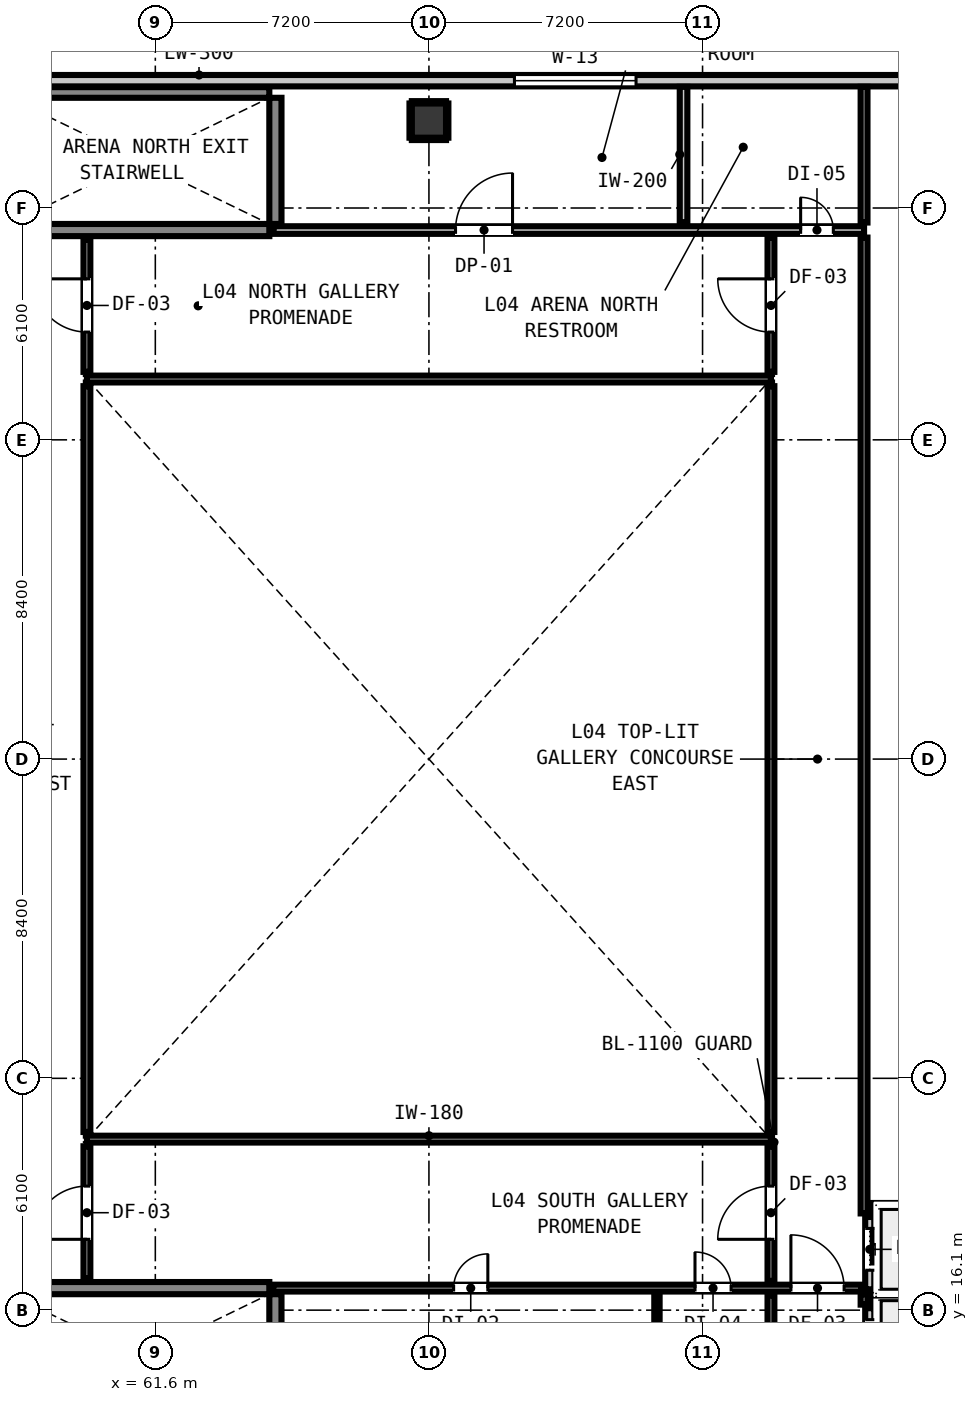
"""IFC4 building model, lengths in metres.
Left out: names, types, materials, properties, quantities, classifications, styles, units other than length and angle.
Written with IfcOpenShell. Run it as: python <this file> out.ifc"""

import sys

from ifc_helpers import new_model, si_unit, direction, frame, frame_2d, origin, origin_2d, place, context, subcontext, project, spatial, rectangle, circle, extrude, element, fill, save


model = new_model("IFC4")
c1 = context("Model", 3, precision=1e-05, world=origin(), true_north=direction((0.0, 1.0)))
c2 = subcontext(c1, "Body", "Model", "MODEL_VIEW")
j1 = project(units=[si_unit("LENGTHUNIT", "METRE"), si_unit("PLANEANGLEUNIT", "RADIAN")], contexts=[c1])
p1 = place(None, origin())
s1 = spatial("IfcSite", under=j1, at=p1, CompositionType="ELEMENT")
p2 = place(p1, origin())
s2 = spatial("IfcBuilding", under=s1, at=p2, CompositionType="ELEMENT")
p3 = place(p2, frame((0.0, 0.0, 17.8)))
s3 = spatial("IfcBuildingStorey", under=s2, at=p3, CompositionType="ELEMENT", Elevation=17.8)
p4 = place(p3, frame((64.76, 13.2, 0.0), z_axis=(0.0, 0.0, 1.0), x_axis=(0.0, 1.0, 0.0)))
e1 = element("IfcWall", 1, at=p4, inside=s3, PredefinedType="SHEAR", context=c2, shape_type="SweptSolid", body=[
    extrude(rectangle(XDim=3.32, YDim=0.32, at=frame_2d((1.66, 0.0))), origin(), (0.0, 0.0, 1.0), 4.2),
])
p5 = place(p3, frame((56.2, 16.68, 0.0), z_axis=(0.0, 0.0, 1.0), x_axis=(1.0, 0.0, 0.0)))
e2 = element("IfcWall", 2, at=p5, inside=s3, PredefinedType="SHEAR", context=c2, shape_type="SweptSolid", body=[
    extrude(rectangle(XDim=8.4, YDim=0.32, at=frame_2d((4.2, 0.0))), origin(), (0.0, 0.0, 1.0), 4.2),
])
p6 = place(p5, frame((0.23, 0.0, 0.0)))
e3 = element("IfcOpeningElement", 3, at=p6, cuts=e2, PredefinedType="OPENING", context=c2, shape_type="SweptSolid", body=[
    extrude(rectangle(XDim=1.1, YDim=2.15, at=frame_2d((0.55, 1.075))), frame((0.0, 0.17, 0.0), z_axis=(0.0, -1.0, 0.0), x_axis=(1.0, 0.0, 0.0)), (0.0, 0.0, 1.0), 0.34),
])
p7 = place(p3, frame((64.76, 44.68, 0.0), z_axis=(0.0, 0.0, 1.0), x_axis=(0.0, 1.0, 0.0)))
e4 = element("IfcWall", 4, at=p7, inside=s3, PredefinedType="SHEAR", context=c2, shape_type="SweptSolid", body=[
    extrude(rectangle(XDim=3.32, YDim=0.32, at=frame_2d((1.66, 0.0))), origin(), (0.0, 0.0, 1.0), 4.2),
])
p8 = place(p3, frame((56.2, 48.14, 0.0), z_axis=(0.0, 0.0, 1.0), x_axis=(1.0, 0.0, 0.0)))
e5 = element("IfcWall", 5, at=p8, inside=s3, PredefinedType="SHEAR", context=c2, shape_type="SweptSolid", body=[
    extrude(rectangle(XDim=8.4, YDim=0.28, at=frame_2d((4.2, 0.0))), origin(), (0.0, 0.0, 1.0), 4.2),
])
p9 = place(p3, frame((56.2, 44.52, 0.0), z_axis=(0.0, 0.0, 1.0), x_axis=(1.0, 0.0, 0.0)))
e6 = element("IfcWall", 6, at=p9, inside=s3, PredefinedType="SHEAR", context=c2, shape_type="SweptSolid", body=[
    extrude(rectangle(XDim=8.4, YDim=0.32, at=frame_2d((4.2, 0.0))), origin(), (0.0, 0.0, 1.0), 4.2),
])
p10 = place(p9, frame((0.23, 0.0, 0.0)))
e7 = element("IfcOpeningElement", 7, at=p10, cuts=e6, PredefinedType="OPENING", context=c2, shape_type="SweptSolid", body=[
    extrude(rectangle(XDim=1.1, YDim=2.15, at=frame_2d((0.55, 1.075))), frame((0.0, 0.17, 0.0), z_axis=(0.0, -1.0, 0.0), x_axis=(1.0, 0.0, 0.0)), (0.0, 0.0, 1.0), 0.34),
])
p11 = place(p3, frame((68.8, 47.4, 0.0), z_axis=(0.0, 0.0, 1.0), x_axis=(1.0, 0.0, 0.0)))
e8 = element("IfcColumn", 8, at=p11, inside=s3, PredefinedType="COLUMN", context=c2, shape_type="SweptSolid", body=[
    extrude(circle(Radius=0.45, at=origin_2d()), origin(), (0.0, 0.0, 1.0), 4.2),
])
p12 = place(p3, frame((54.55, 48.45, 0.0), z_axis=(0.0, 0.0, 1.0), x_axis=(1.0, 0.0, 0.0)))
e9 = element("IfcWall", 9, at=p12, inside=s3, PredefinedType="STANDARD", context=c2, shape_type="SweptSolid", body=[
    extrude(rectangle(XDim=28.5, YDim=0.3, at=frame_2d((14.25, 0.0))), origin(), (0.0, 0.0, 1.0), 4.2),
])
p13 = place(p12, frame((16.5, 0.0, 1.6)))
e10 = element("IfcOpeningElement", 10, at=p13, cuts=e9, PredefinedType="OPENING", context=c2, shape_type="SweptSolid", body=[
    extrude(rectangle(XDim=3.2, YDim=1.4, at=frame_2d((1.6, 0.7))), frame((0.0, 0.16, 0.0), z_axis=(0.0, -1.0, 0.0), x_axis=(1.0, 0.0, 0.0)), (0.0, 0.0, 1.0), 0.32),
])
p14 = place(p3, frame((80.4, 16.4, 0.0), z_axis=(0.0, 0.0, 1.0), x_axis=(1.0, 0.0, 0.0)))
e11 = element("IfcWall", 11, at=p14, inside=s3, PredefinedType="PARTITIONING", context=c2, shape_type="SweptSolid", body=[
    extrude(rectangle(XDim=2.2, YDim=0.24, at=frame_2d((1.1, 0.0))), origin(), (0.0, 0.0, 1.0), 3.78),
])
p15 = place(p3, frame((80.4, 14.448, 0.0), z_axis=(0.0, 0.0, 1.0), x_axis=(0.0, 1.0, 0.0)))
e12 = element("IfcWall", 12, at=p15, inside=s3, PredefinedType="PARTITIONING", context=c2, shape_type="SweptSolid", body=[
    extrude(rectangle(XDim=1.704, YDim=0.24, at=frame_2d((0.852, 0.0))), origin(), (0.0, 0.0, 1.0), 3.78),
])
p16 = place(p15, frame((0.302, 0.0, 0.0)))
e13 = element("IfcOpeningElement", 13, at=p16, cuts=e12, PredefinedType="OPENING", context=c2, shape_type="SweptSolid", body=[
    extrude(rectangle(XDim=1.1, YDim=2.15, at=frame_2d((0.55, 1.075))), frame((0.0, 0.13, 0.0), z_axis=(0.0, -1.0, 0.0), x_axis=(1.0, 0.0, 0.0)), (0.0, 0.0, 1.0), 0.26),
])
p17 = place(p3, frame((80.4, 18.8, 0.0), z_axis=(0.0, 0.0, 1.0), x_axis=(1.0, 0.0, 0.0)))
e14 = element("IfcWall", 14, at=p17, inside=s3, PredefinedType="PARTITIONING", context=c2, shape_type="SweptSolid", body=[
    extrude(rectangle(XDim=2.2, YDim=0.24, at=frame_2d((1.1, 0.0))), origin(), (0.0, 0.0, 1.0), 3.78),
])
p18 = place(p3, frame((80.4, 16.648, 0.0), z_axis=(0.0, 0.0, 1.0), x_axis=(0.0, 1.0, 0.0)))
e15 = element("IfcWall", 15, at=p18, inside=s3, PredefinedType="PARTITIONING", context=c2, shape_type="SweptSolid", body=[
    extrude(rectangle(XDim=1.904, YDim=0.24, at=frame_2d((0.952, 0.0))), origin(), (0.0, 0.0, 1.0), 3.78),
])
p19 = place(p18, frame((0.502, 0.0, 0.0)))
e16 = element("IfcOpeningElement", 16, at=p19, cuts=e15, PredefinedType="OPENING", context=c2, shape_type="SweptSolid", body=[
    extrude(rectangle(XDim=1.1, YDim=2.15, at=frame_2d((0.55, 1.075))), frame((0.0, 0.13, 0.0), z_axis=(0.0, -1.0, 0.0), x_axis=(1.0, 0.0, 0.0)), (0.0, 0.0, 1.0), 0.26),
])
p20 = place(p3, frame((64.71, 44.52, 0.0), z_axis=(0.0, 0.0, 1.0), x_axis=(1.0, 0.0, 0.0)))
e17 = element("IfcWall", 17, at=p20, inside=s3, PredefinedType="PARTITIONING", context=c2, shape_type="SweptSolid", body=[
    extrude(rectangle(XDim=15.54, YDim=0.2, at=frame_2d((7.77, 0.0))), origin(), (0.0, 0.0, 1.0), 3.78),
])
p21 = place(p20, frame((4.79, 0.0, 0.0)))
e18 = element("IfcOpeningElement", 18, at=p21, cuts=e17, PredefinedType="OPENING", context=c2, shape_type="SweptSolid", body=[
    extrude(rectangle(XDim=1.5, YDim=2.15, at=frame_2d((0.75, 1.075))), frame((0.0, 0.11, 0.0), z_axis=(0.0, -1.0, 0.0), x_axis=(1.0, 0.0, 0.0)), (0.0, 0.0, 1.0), 0.22),
])
p22 = place(p20, frame((13.871, 0.0, 0.0)))
e19 = element("IfcOpeningElement", 19, at=p22, cuts=e17, PredefinedType="OPENING", context=c2, shape_type="SweptSolid", body=[
    extrude(rectangle(XDim=0.86, YDim=2.02, at=frame_2d((0.43, 1.01))), frame((0.0, 0.11, 0.0), z_axis=(0.0, -1.0, 0.0), x_axis=(1.0, 0.0, 0.0)), (0.0, 0.0, 1.0), 0.22),
])
p23 = place(p3, frame((64.7, 16.68, 0.0), z_axis=(0.0, 0.0, 1.0), x_axis=(1.0, 0.0, 0.0)))
e20 = element("IfcWall", 20, at=p23, inside=s3, PredefinedType="PARTITIONING", context=c2, shape_type="SweptSolid", body=[
    extrude(rectangle(XDim=15.482, YDim=0.18, at=frame_2d((7.741, 0.0))), origin(), (0.0, 0.0, 1.0), 3.78),
])
p24 = place(p23, frame((13.625, 0.0, 0.0)))
e21 = element("IfcOpeningElement", 21, at=p24, cuts=e20, PredefinedType="OPENING", context=c2, shape_type="SweptSolid", body=[
    extrude(rectangle(XDim=1.4, YDim=2.15, at=frame_2d((0.7, 1.075))), frame((0.0, 0.1, 0.0), z_axis=(0.0, -1.0, 0.0), x_axis=(1.0, 0.0, 0.0)), (0.0, 0.0, 1.0), 0.2),
])
p25 = place(p23, frame((4.75, 0.0, 0.0)))
e22 = element("IfcOpeningElement", 22, at=p25, cuts=e20, PredefinedType="OPENING", context=c2, shape_type="SweptSolid", body=[
    extrude(rectangle(XDim=0.9, YDim=2.1, at=frame_2d((0.45, 1.05))), frame((0.0, 0.1, 0.0), z_axis=(0.0, -1.0, 0.0), x_axis=(1.0, 0.0, 0.0)), (0.0, 0.0, 1.0), 0.2),
])
p26 = place(p23, frame((11.101, 0.0, 0.0)))
e23 = element("IfcOpeningElement", 23, at=p26, cuts=e20, PredefinedType="OPENING", context=c2, shape_type="SweptSolid", body=[
    extrude(rectangle(XDim=0.95, YDim=2.1, at=frame_2d((0.475, 1.05))), frame((0.0, 0.1, 0.0), z_axis=(0.0, -1.0, 0.0), x_axis=(1.0, 0.0, 0.0)), (0.0, 0.0, 1.0), 0.2),
])
for number, where, z_axis, x_axis in (
    (24, (59.8, 20.6, 0.0), (0.0, 0.0, 1.0), (1.0, 0.0, 0.0)),
    (25, (59.8, 40.6, 0.0), (0.0, 0.0, 1.0), (1.0, 0.0, 0.0)),
):
    element("IfcWall", number, at=place(p3, frame(where, z_axis=z_axis, x_axis=x_axis)), inside=s3, PredefinedType="PARTITIONING", context=c2, shape_type="SweptSolid", body=[
        extrude(rectangle(XDim=18.0, YDim=0.18, at=frame_2d((9.0, 0.0))), origin(), (0.0, 0.0, 1.0), 3.78),
    ])
p27 = place(p3, frame((75.5, 44.728, 0.0), z_axis=(0.0, 0.0, 1.0), x_axis=(0.0, 1.0, 0.0)))
e26 = element("IfcWall", 26, at=p27, inside=s3, PredefinedType="PARTITIONING", context=c2, shape_type="SweptSolid", body=[
    extrude(rectangle(XDim=3.56, YDim=0.2, at=frame_2d((1.78, 0.0))), origin(), (0.0, 0.0, 1.0), 3.78),
])
p28 = place(p3, frame((59.8, 16.94, 0.0), z_axis=(0.0, 0.0, 1.0), x_axis=(0.0, 1.0, 0.0)))
e27 = element("IfcWall", 27, at=p28, inside=s3, PredefinedType="PARTITIONING", context=c2, shape_type="SweptSolid", body=[
    extrude(rectangle(XDim=3.472, YDim=0.18, at=frame_2d((1.736, 0.0))), origin(), (0.0, 0.0, 1.0), 3.78),
])
p29 = place(p28, frame((1.024, 0.0, 0.0)))
e28 = element("IfcOpeningElement", 28, at=p29, cuts=e27, PredefinedType="OPENING", context=c2, shape_type="SweptSolid", body=[
    extrude(rectangle(XDim=1.4, YDim=2.15, at=frame_2d((0.7, 1.075))), frame((0.0, 0.1, 0.0), z_axis=(0.0, -1.0, 0.0), x_axis=(1.0, 0.0, 0.0)), (0.0, 0.0, 1.0), 0.2),
])
p30 = place(p3, frame((59.8, 20.788, 0.0), z_axis=(0.0, 0.0, 1.0), x_axis=(0.0, 1.0, 0.0)))
e29 = element("IfcWall", 29, at=p30, inside=s3, PredefinedType="PARTITIONING", context=c2, shape_type="SweptSolid", body=[
    extrude(rectangle(XDim=19.624, YDim=0.18, at=frame_2d((9.812, 0.0))), origin(), (0.0, 0.0, 1.0), 3.78),
])
p31 = place(p3, frame((59.8, 40.788, 0.0), z_axis=(0.0, 0.0, 1.0), x_axis=(0.0, 1.0, 0.0)))
e30 = element("IfcWall", 30, at=p31, inside=s3, PredefinedType="PARTITIONING", context=c2, shape_type="SweptSolid", body=[
    extrude(rectangle(XDim=3.472, YDim=0.18, at=frame_2d((1.736, 0.0))), origin(), (0.0, 0.0, 1.0), 3.78),
])
p32 = place(p31, frame((1.048, 0.0, 0.0)))
e31 = element("IfcOpeningElement", 31, at=p32, cuts=e30, PredefinedType="OPENING", context=c2, shape_type="SweptSolid", body=[
    extrude(rectangle(XDim=1.4, YDim=2.15, at=frame_2d((0.7, 1.075))), frame((0.0, 0.1, 0.0), z_axis=(0.0, -1.0, 0.0), x_axis=(1.0, 0.0, 0.0)), (0.0, 0.0, 1.0), 0.2),
])
p33 = place(p3, frame((77.8, 12.912, 0.0), z_axis=(0.0, 0.0, 1.0), x_axis=(0.0, 1.0, 0.0)))
e32 = element("IfcWall", 32, at=p33, inside=s3, PredefinedType="PARTITIONING", context=c2, shape_type="SweptSolid", body=[
    extrude(rectangle(XDim=3.58, YDim=0.18, at=frame_2d((1.79, 0.0))), origin(), (0.0, 0.0, 1.0), 3.78),
])
p34 = place(p3, frame((77.8, 16.868, 0.0), z_axis=(0.0, 0.0, 1.0), x_axis=(0.0, 1.0, 0.0)))
e33 = element("IfcWall", 33, at=p34, inside=s3, PredefinedType="PARTITIONING", context=c2, shape_type="SweptSolid", body=[
    extrude(rectangle(XDim=3.544, YDim=0.18, at=frame_2d((1.772, 0.0))), origin(), (0.0, 0.0, 1.0), 3.78),
])
p35 = place(p34, frame((1.096, 0.0, 0.0)))
e34 = element("IfcOpeningElement", 34, at=p35, cuts=e33, PredefinedType="OPENING", context=c2, shape_type="SweptSolid", body=[
    extrude(rectangle(XDim=1.4, YDim=2.15, at=frame_2d((0.7, 1.075))), frame((0.0, 0.1, 0.0), z_axis=(0.0, -1.0, 0.0), x_axis=(1.0, 0.0, 0.0)), (0.0, 0.0, 1.0), 0.2),
])
p36 = place(p3, frame((77.8, 20.788, 0.0), z_axis=(0.0, 0.0, 1.0), x_axis=(0.0, 1.0, 0.0)))
e35 = element("IfcWall", 35, at=p36, inside=s3, PredefinedType="PARTITIONING", context=c2, shape_type="SweptSolid", body=[
    extrude(rectangle(XDim=19.624, YDim=0.18, at=frame_2d((9.812, 0.0))), origin(), (0.0, 0.0, 1.0), 3.78),
])
p37 = place(p3, frame((77.8, 40.788, 0.0), z_axis=(0.0, 0.0, 1.0), x_axis=(0.0, 1.0, 0.0)))
e36 = element("IfcWall", 36, at=p37, inside=s3, PredefinedType="PARTITIONING", context=c2, shape_type="SweptSolid", body=[
    extrude(rectangle(XDim=3.534, YDim=0.18, at=frame_2d((1.767, 0.0))), origin(), (0.0, 0.0, 1.0), 3.78),
])
p38 = place(p37, frame((1.048, 0.0, 0.0)))
e37 = element("IfcOpeningElement", 37, at=p38, cuts=e36, PredefinedType="OPENING", context=c2, shape_type="SweptSolid", body=[
    extrude(rectangle(XDim=1.4, YDim=2.15, at=frame_2d((0.7, 1.075))), frame((0.0, 0.1, 0.0), z_axis=(0.0, -1.0, 0.0), x_axis=(1.0, 0.0, 0.0)), (0.0, 0.0, 1.0), 0.2),
])
p39 = place(p3, frame((80.25, 16.245, 0.0), z_axis=(0.0, 0.0, 1.0), x_axis=(0.0, 1.0, 0.0)))
e38 = element("IfcWall", 38, at=p39, inside=s3, PredefinedType="PARTITIONING", context=c2, shape_type="SweptSolid", body=[
    extrude(rectangle(XDim=0.275, YDim=0.18, at=frame_2d((0.137, 0.0))), origin(), (0.0, 0.0, 1.0), 3.78),
])
p40 = place(p3, frame((80.25, 18.645, 0.0), z_axis=(0.0, 0.0, 1.0), x_axis=(0.0, 1.0, 0.0)))
e39 = element("IfcWall", 39, at=p40, inside=s3, PredefinedType="PARTITIONING", context=c2, shape_type="SweptSolid", body=[
    extrude(rectangle(XDim=25.677, YDim=0.18, at=frame_2d((12.838, 0.0))), origin(), (0.0, 0.0, 1.0), 3.78),
])
p41 = place(p3, frame((80.25, 44.718, 0.0), z_axis=(0.0, 0.0, 1.0), x_axis=(0.0, 1.0, 0.0)))
e40 = element("IfcWall", 40, at=p41, inside=s3, PredefinedType="PARTITIONING", context=c2, shape_type="SweptSolid", body=[
    extrude(rectangle(XDim=3.57, YDim=0.18, at=frame_2d((1.785, 0.0))), origin(), (0.0, 0.0, 1.0), 3.78),
])
p42 = place(p3, frame((74.8, 12.912, 0.0), z_axis=(0.0, 0.0, 1.0), x_axis=(0.0, 1.0, 0.0)))
e41 = element("IfcWall", 41, at=p42, inside=s3, PredefinedType="PARTITIONING", context=c2, shape_type="SweptSolid", body=[
    extrude(rectangle(XDim=3.6, YDim=0.14, at=frame_2d((1.8, 0.0))), origin(), (0.0, 0.0, 1.0), 3.78),
])
for number, where, z_axis, x_axis in (
    (42, (68.35, 46.918, 0.0), (0.0, 0.0, 1.0), (1.0, 0.0, 0.0)),
    (43, (68.35, 47.882, 0.0), (0.0, 0.0, 1.0), (1.0, 0.0, 0.0)),
):
    element("IfcWall", number, at=place(p3, frame(where, z_axis=z_axis, x_axis=x_axis)), inside=s3, PredefinedType="PARTITIONING", context=c2, shape_type="SweptSolid", body=[
        extrude(rectangle(XDim=0.9, YDim=0.06, at=frame_2d((0.45, 0.0))), origin(), (0.0, 0.0, 1.0), 1.45),
    ])
for number, where, z_axis, x_axis in (
    (44, (68.318, 46.95, 0.0), (0.0, 0.0, 1.0), (0.0, 1.0, 0.0)),
    (45, (69.282, 46.95, 0.0), (0.0, 0.0, 1.0), (0.0, 1.0, 0.0)),
):
    element("IfcWall", number, at=place(p3, frame(where, z_axis=z_axis, x_axis=x_axis)), inside=s3, PredefinedType="PARTITIONING", context=c2, shape_type="SweptSolid", body=[
        extrude(rectangle(XDim=0.9, YDim=0.06, at=frame_2d((0.45, 0.0))), origin(), (0.0, 0.0, 1.0), 1.45),
    ])
p43 = place(p13, origin())
e46 = element("IfcWindow", 46, at=p43, inside=s3, PartitioningType="SINGLE_PANEL", PredefinedType="LIGHTDOME", context=c2, shape_type="SweptSolid", body=[
    extrude(rectangle(XDim=3.2, YDim=1.4, at=frame_2d((1.6, 0.7))), frame((0.0, 0.03, 0.0), z_axis=(0.0, -1.0, 0.0), x_axis=(1.0, 0.0, 0.0)), (0.0, 0.0, 1.0), 0.06),
])
fill(e10, e46)
p44 = place(p16, origin())
e47 = element("IfcDoor", 47, at=p44, inside=s3, OperationType="SLIDING_TO_LEFT", PredefinedType="DOOR", context=c2, shape_type="SweptSolid", body=[
    extrude(rectangle(XDim=1.1, YDim=2.15, at=frame_2d((0.55, 1.075))), frame((0.0, 0.025, 0.0), z_axis=(0.0, -1.0, 0.0), x_axis=(1.0, 0.0, 0.0)), (0.0, 0.0, 1.0), 0.05),
])
fill(e13, e47)
p45 = place(p19, origin())
e48 = element("IfcDoor", 48, at=p45, inside=s3, OperationType="SLIDING_TO_RIGHT", PredefinedType="DOOR", context=c2, shape_type="SweptSolid", body=[
    extrude(rectangle(XDim=1.1, YDim=2.15, at=frame_2d((0.55, 1.075))), frame((0.0, 0.025, 0.0), z_axis=(0.0, -1.0, 0.0), x_axis=(1.0, 0.0, 0.0)), (0.0, 0.0, 1.0), 0.05),
])
fill(e16, e48)
p46 = place(p29, origin())
e49 = element("IfcDoor", 49, at=p46, inside=s3, OperationType="SINGLE_SWING_LEFT", PredefinedType="DOOR", context=c2, shape_type="SweptSolid", body=[
    extrude(rectangle(XDim=1.4, YDim=2.15, at=frame_2d((0.7, 1.075))), frame((0.0, 0.025, 0.0), z_axis=(0.0, -1.0, 0.0), x_axis=(1.0, 0.0, 0.0)), (0.0, 0.0, 1.0), 0.05),
])
fill(e28, e49)
p47 = place(p32, origin())
e50 = element("IfcDoor", 50, at=p47, inside=s3, OperationType="SINGLE_SWING_RIGHT", PredefinedType="DOOR", context=c2, shape_type="SweptSolid", body=[
    extrude(rectangle(XDim=1.4, YDim=2.15, at=frame_2d((0.7, 1.075))), frame((0.0, 0.025, 0.0), z_axis=(0.0, -1.0, 0.0), x_axis=(1.0, 0.0, 0.0)), (0.0, 0.0, 1.0), 0.05),
])
fill(e31, e50)
p48 = place(p35, origin())
e51 = element("IfcDoor", 51, at=p48, inside=s3, OperationType="SINGLE_SWING_LEFT", PredefinedType="DOOR", context=c2, shape_type="SweptSolid", body=[
    extrude(rectangle(XDim=1.4, YDim=2.15, at=frame_2d((0.7, 1.075))), frame((0.0, 0.025, 0.0), z_axis=(0.0, -1.0, 0.0), x_axis=(1.0, 0.0, 0.0)), (0.0, 0.0, 1.0), 0.05),
])
fill(e34, e51)
p49 = place(p38, origin())
e52 = element("IfcDoor", 52, at=p49, inside=s3, OperationType="SINGLE_SWING_RIGHT", PredefinedType="DOOR", context=c2, shape_type="SweptSolid", body=[
    extrude(rectangle(XDim=1.4, YDim=2.15, at=frame_2d((0.7, 1.075))), frame((0.0, 0.025, 0.0), z_axis=(0.0, -1.0, 0.0), x_axis=(1.0, 0.0, 0.0)), (0.0, 0.0, 1.0), 0.05),
])
fill(e37, e52)
p50 = place(p24, origin())
e53 = element("IfcDoor", 53, at=p50, inside=s3, OperationType="SINGLE_SWING_LEFT", PredefinedType="DOOR", context=c2, shape_type="SweptSolid", body=[
    extrude(rectangle(XDim=1.4, YDim=2.15, at=frame_2d((0.7, 1.075))), frame((0.0, 0.025, 0.0), z_axis=(0.0, -1.0, 0.0), x_axis=(1.0, 0.0, 0.0)), (0.0, 0.0, 1.0), 0.05),
])
fill(e21, e53)
p51 = place(p25, origin())
e54 = element("IfcDoor", 54, at=p51, inside=s3, OperationType="SINGLE_SWING_RIGHT", PredefinedType="DOOR", context=c2, shape_type="SweptSolid", body=[
    extrude(rectangle(XDim=0.9, YDim=2.1, at=frame_2d((0.45, 1.05))), frame((0.0, 0.025, 0.0), z_axis=(0.0, -1.0, 0.0), x_axis=(1.0, 0.0, 0.0)), (0.0, 0.0, 1.0), 0.05),
])
fill(e22, e54)
p52 = place(p26, origin())
e55 = element("IfcDoor", 55, at=p52, inside=s3, OperationType="SINGLE_SWING_LEFT", PredefinedType="DOOR", context=c2, shape_type="SweptSolid", body=[
    extrude(rectangle(XDim=0.95, YDim=2.1, at=frame_2d((0.475, 1.05))), frame((0.0, 0.025, 0.0), z_axis=(0.0, -1.0, 0.0), x_axis=(1.0, 0.0, 0.0)), (0.0, 0.0, 1.0), 0.05),
])
fill(e23, e55)
p53 = place(p21, origin())
e56 = element("IfcDoor", 56, at=p53, inside=s3, OperationType="SINGLE_SWING_RIGHT", PredefinedType="DOOR", context=c2, shape_type="SweptSolid", body=[
    extrude(rectangle(XDim=1.5, YDim=2.15, at=frame_2d((0.75, 1.075))), frame((0.0, 0.025, 0.0), z_axis=(0.0, -1.0, 0.0), x_axis=(1.0, 0.0, 0.0)), (0.0, 0.0, 1.0), 0.05),
])
fill(e18, e56)
p54 = place(p22, origin())
e57 = element("IfcDoor", 57, at=p54, inside=s3, OperationType="SINGLE_SWING_LEFT", PredefinedType="DOOR", context=c2, shape_type="SweptSolid", body=[
    extrude(rectangle(XDim=0.86, YDim=2.02, at=frame_2d((0.43, 1.01))), frame((0.0, 0.025, 0.0), z_axis=(0.0, -1.0, 0.0), x_axis=(1.0, 0.0, 0.0)), (0.0, 0.0, 1.0), 0.05),
])
fill(e19, e57)
save(model, sys.argv[1])
